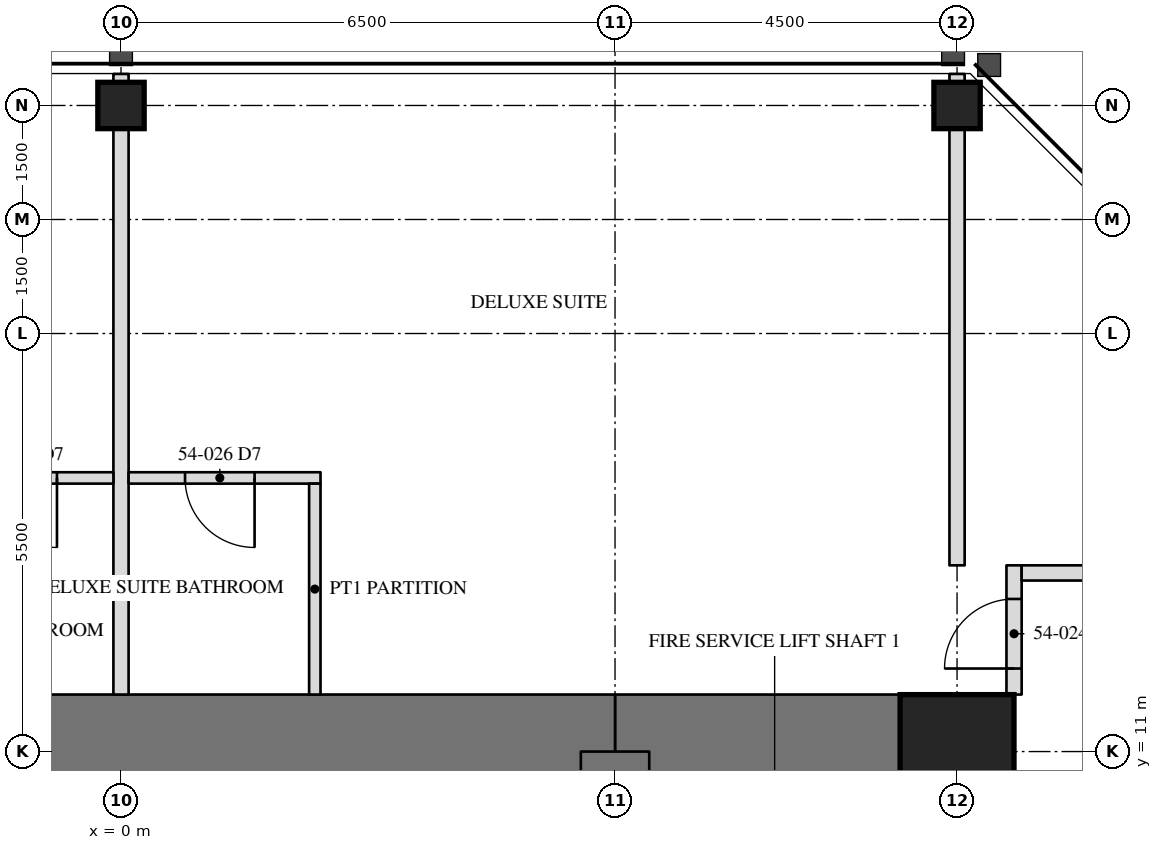
"""IFC4 building model, lengths in metres.
Left out: names, types, materials, properties, quantities, classifications, styles, units other than length and angle.
Written with IfcOpenShell. Run it as: python <this file> out.ifc"""

import sys

from ifc_helpers import new_model, si_unit, direction, frame, frame_2d, origin, origin_2d, place, context, subcontext, project, spatial, rectangle, hollow_rectangle, extrude, element, fill, save


model = new_model("IFC4")
c1 = context("Model", 3, precision=1e-05, world=origin(), true_north=direction((0.0, 1.0)))
c2 = subcontext(c1, "Body", "Model", "MODEL_VIEW")
j1 = project(units=[si_unit("LENGTHUNIT", "METRE"), si_unit("PLANEANGLEUNIT", "RADIAN")], contexts=[c1])
p1 = place(None, origin())
s1 = spatial("IfcSite", under=j1, at=p1, CompositionType="ELEMENT")
p2 = place(p1, origin())
s2 = spatial("IfcBuilding", under=s1, at=p2, CompositionType="ELEMENT")
p3 = place(p2, frame((0.0, 0.0, 225.7)))
s3 = spatial("IfcBuildingStorey", under=s2, at=p3, CompositionType="ELEMENT", Elevation=225.7)
for number, where, z_axis, x_axis in (
    (1, (11.0, 19.5, 0.0), (0.0, 0.0, 1.0), (1.0, 0.0, 0.0)),
    (2, (0.0, 19.5, 0.0), (0.0, 0.0, 1.0), (1.0, 0.0, 0.0)),
):
    element("IfcColumn", number, at=place(p3, frame(where, z_axis=z_axis, x_axis=x_axis)), inside=s3, PredefinedType="COLUMN", context=c2, shape_type="SweptSolid", body=[
        extrude(hollow_rectangle(XDim=0.61, YDim=0.61, WallThickness=0.076, at=origin_2d()), origin(), (0.0, 0.0, 1.0), 3.5),
    ])
p4 = place(p3, frame((11.0, -11.0, 0.0), z_axis=(0.0, 0.0, 1.0), x_axis=(0.0, 1.0, 0.0)))
e3 = element("IfcWall", 3, at=p4, inside=s3, PredefinedType="SHEAR", context=c2, shape_type="SweptSolid", body=[
    extrude(rectangle(XDim=22.0, YDim=1.5, at=frame_2d((11.0, 0.0))), origin(), (0.0, 0.0, 1.0), 3.5),
])
p5 = place(p4, frame((15.393, 0.0, 0.0)))
e4 = element("IfcOpeningElement", 4, at=p5, cuts=e3, PredefinedType="OPENING", context=c2, shape_type="SweptSolid", body=[
    extrude(rectangle(XDim=0.915, YDim=2.134, at=frame_2d((0.458, 1.067))), frame((0.0, 0.76, 0.0), z_axis=(0.0, -1.0, 0.0), x_axis=(1.0, 0.0, 0.0)), (0.0, 0.0, 1.0), 1.52),
])
p6 = place(p3, frame((11.0, 11.0, 0.0), z_axis=(0.0, 0.0, 1.0), x_axis=(-1.0, 0.0, 0.0)))
e5 = element("IfcWall", 5, at=p6, inside=s3, PredefinedType="SHEAR", context=c2, shape_type="SweptSolid", body=[
    extrude(rectangle(XDim=4.5, YDim=1.5, at=frame_2d((2.25, 0.0))), origin(), (0.0, 0.0, 1.0), 3.5),
])
p7 = place(p3, frame((6.5, 11.0, 0.0), z_axis=(0.0, 0.0, 1.0), x_axis=(-1.0, 0.0, 0.0)))
e6 = element("IfcWall", 6, at=p7, inside=s3, PredefinedType="SHEAR", context=c2, shape_type="SweptSolid", body=[
    extrude(rectangle(XDim=13.0, YDim=1.5, at=frame_2d((6.5, 0.0))), origin(), (0.0, 0.0, 1.0), 3.5),
])
p8 = place(p3, frame((6.5, 6.5, 0.0), z_axis=(0.0, 0.0, 1.0), x_axis=(0.0, 1.0, 0.0)))
e7 = element("IfcWall", 7, at=p8, inside=s3, PredefinedType="SHEAR", context=c2, shape_type="SweptSolid", body=[
    extrude(rectangle(XDim=4.5, YDim=0.9, at=frame_2d((2.25, 0.0))), origin(), (0.0, 0.0, 1.0), 3.5),
])
p9 = place(p3, frame((11.0, 11.0, 0.0), z_axis=(0.0, 0.0, 1.0), x_axis=(1.0, 0.0, 0.0)))
e8 = element("IfcColumn", 8, at=p9, inside=s3, PredefinedType="COLUMN", context=c2, shape_type="SweptSolid", body=[
    extrude(hollow_rectangle(XDim=1.499, YDim=1.499, WallThickness=0.102, at=origin_2d()), origin(), (0.0, 0.0, 1.0), 3.5),
])
p10 = place(p3, frame((11.75, 11.75, 0.0), z_axis=(0.0, 0.0, 1.0), x_axis=(0.0, 1.0, 0.0)))
e9 = element("IfcWall", 9, at=p10, inside=s3, PredefinedType="PARTITIONING", context=c2, shape_type="SweptSolid", body=[
    extrude(rectangle(XDim=1.7, YDim=0.2, at=frame_2d((0.85, 0.0))), origin(), (0.0, 0.0, 1.0), 3.31),
])
p11 = place(p10, frame((0.343, 0.0, 0.0)))
e10 = element("IfcOpeningElement", 10, at=p11, cuts=e9, PredefinedType="OPENING", context=c2, shape_type="SweptSolid", body=[
    extrude(rectangle(XDim=0.915, YDim=2.134, at=frame_2d((0.458, 1.067))), frame((0.0, 0.11, 0.0), z_axis=(0.0, -1.0, 0.0), x_axis=(1.0, 0.0, 0.0)), (0.0, 0.0, 1.0), 0.22),
])
p12 = place(p3, frame((13.85, 13.35, 0.0), z_axis=(0.0, 0.0, 1.0), x_axis=(-1.0, 0.0, 0.0)))
e11 = element("IfcWall", 11, at=p12, inside=s3, PredefinedType="PARTITIONING", context=c2, shape_type="SweptSolid", body=[
    extrude(rectangle(XDim=2.0, YDim=0.2, at=frame_2d((1.0, 0.0))), origin(), (0.0, 0.0, 1.0), 3.31),
])
p13 = place(p3, frame((11.0, 13.45, 0.0), z_axis=(0.0, 0.0, 1.0), x_axis=(0.0, 1.0, 0.0)))
e12 = element("IfcWall", 12, at=p13, inside=s3, PredefinedType="PARTITIONING", context=c2, shape_type="SweptSolid", body=[
    extrude(rectangle(XDim=6.465, YDim=0.2, at=frame_2d((3.232, 0.0))), origin(), (0.0, 0.0, 1.0), 2.802),
])
p14 = place(p3, frame((0.0, 11.75, 0.0), z_axis=(0.0, 0.0, 1.0), x_axis=(0.0, 1.0, 0.0)))
e13 = element("IfcWall", 13, at=p14, inside=s3, PredefinedType="PARTITIONING", context=c2, shape_type="SweptSolid", body=[
    extrude(rectangle(XDim=8.165, YDim=0.2, at=frame_2d((4.083, 0.0))), origin(), (0.0, 0.0, 1.0), 2.802),
])
p15 = place(p3, frame((2.625, 14.6, 0.0), z_axis=(0.0, 0.0, 1.0), x_axis=(-1.0, 0.0, 0.0)))
e14 = element("IfcWall", 14, at=p15, inside=s3, PredefinedType="PARTITIONING", context=c2, shape_type="SweptSolid", body=[
    extrude(rectangle(XDim=2.525, YDim=0.15, at=frame_2d((1.262, 0.0))), origin(), (0.0, 0.0, 1.0), 3.31),
])
p16 = place(p15, frame((0.867, 0.0, 0.0)))
e15 = element("IfcOpeningElement", 15, at=p16, cuts=e14, PredefinedType="OPENING", context=c2, shape_type="SweptSolid", body=[
    extrude(rectangle(XDim=0.915, YDim=2.032, at=frame_2d((0.458, 1.016))), frame((0.0, 0.085, 0.0), z_axis=(0.0, -1.0, 0.0), x_axis=(1.0, 0.0, 0.0)), (0.0, 0.0, 1.0), 0.17),
])
p17 = place(p3, frame((2.55, 11.75, 0.0), z_axis=(0.0, 0.0, 1.0), x_axis=(0.0, 1.0, 0.0)))
e16 = element("IfcWall", 16, at=p17, inside=s3, PredefinedType="PARTITIONING", context=c2, shape_type="SweptSolid", body=[
    extrude(rectangle(XDim=2.775, YDim=0.15, at=frame_2d((1.387, 0.0))), origin(), (0.0, 0.0, 1.0), 3.31),
])
p18 = place(p3, frame((-0.1, 14.6, 0.0), z_axis=(0.0, 0.0, 1.0), x_axis=(-1.0, 0.0, 0.0)))
e17 = element("IfcWall", 17, at=p18, inside=s3, PredefinedType="PARTITIONING", context=c2, shape_type="SweptSolid", body=[
    extrude(rectangle(XDim=2.525, YDim=0.15, at=frame_2d((1.262, 0.0))), origin(), (0.0, 0.0, 1.0), 3.31),
])
p19 = place(p18, frame((0.742, 0.0, 0.0)))
e18 = element("IfcOpeningElement", 18, at=p19, cuts=e17, PredefinedType="OPENING", context=c2, shape_type="SweptSolid", body=[
    extrude(rectangle(XDim=0.915, YDim=2.032, at=frame_2d((0.458, 1.016))), frame((0.0, 0.085, 0.0), z_axis=(0.0, -1.0, 0.0), x_axis=(1.0, 0.0, 0.0)), (0.0, 0.0, 1.0), 0.17),
])
p20 = place(p11, origin())
e19 = element("IfcDoor", 19, at=p20, inside=s3, OperationType="SINGLE_SWING_LEFT", PredefinedType="DOOR", context=c2, shape_type="SweptSolid", body=[
    extrude(rectangle(XDim=0.915, YDim=2.134, at=frame_2d((0.458, 1.067))), frame((0.0, 0.025, 0.0), z_axis=(0.0, -1.0, 0.0), x_axis=(1.0, 0.0, 0.0)), (0.0, 0.0, 1.0), 0.05),
])
fill(e10, e19)
p21 = place(p16, origin())
e20 = element("IfcDoor", 20, at=p21, inside=s3, OperationType="SINGLE_SWING_LEFT", PredefinedType="DOOR", context=c2, shape_type="SweptSolid", body=[
    extrude(rectangle(XDim=0.915, YDim=2.032, at=frame_2d((0.458, 1.016))), frame((0.0, 0.025, 0.0), z_axis=(0.0, -1.0, 0.0), x_axis=(1.0, 0.0, 0.0)), (0.0, 0.0, 1.0), 0.05),
])
fill(e15, e20)
p22 = place(p19, origin())
e21 = element("IfcDoor", 21, at=p22, inside=s3, OperationType="SINGLE_SWING_LEFT", PredefinedType="DOOR", context=c2, shape_type="SweptSolid", body=[
    extrude(rectangle(XDim=0.915, YDim=2.032, at=frame_2d((0.458, 1.016))), frame((0.0, 0.025, 0.0), z_axis=(0.0, -1.0, 0.0), x_axis=(1.0, 0.0, 0.0)), (0.0, 0.0, 1.0), 0.05),
])
fill(e18, e21)
save(model, sys.argv[1])
